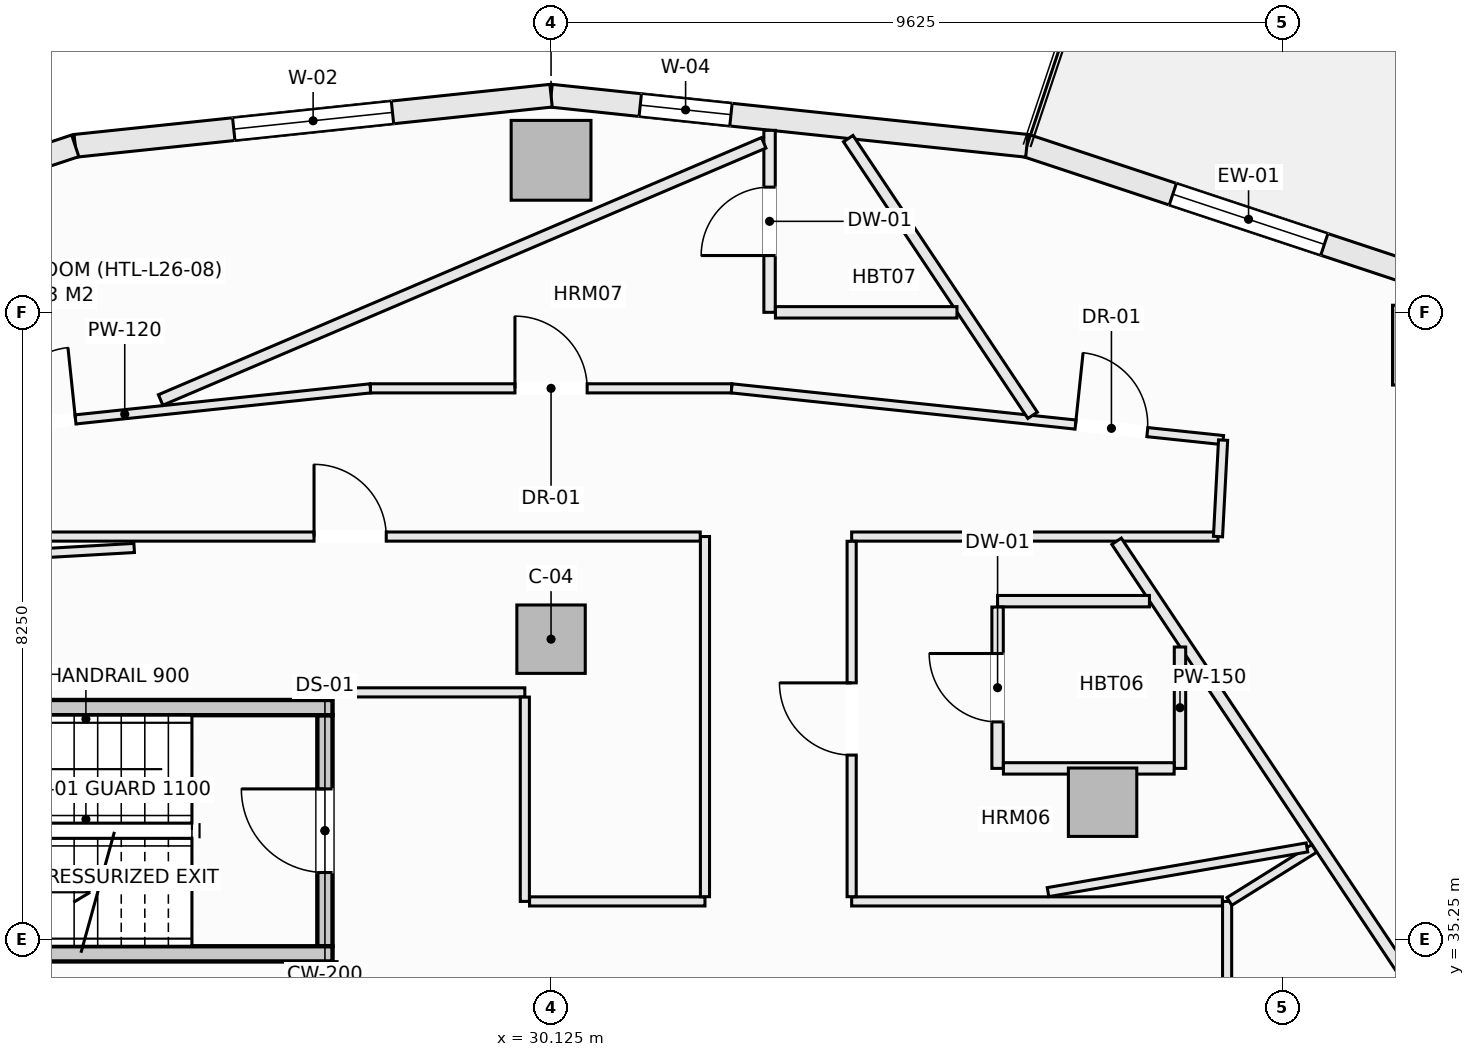
"""IFC4 building model, lengths in metres.
Left out: names, types, materials, properties, quantities, classifications, styles, units other than length and angle.
Written with IfcOpenShell. Run it as: python <this file> out.ifc"""

import sys

from ifc_helpers import new_model, si_unit, direction, frame, frame_2d, origin, origin_2d, place, context, subcontext, project, spatial, rectangle, extrude, element, fill, save


model = new_model("IFC4")
c1 = context("Model", 3, precision=1e-05, world=origin(), true_north=direction((0.0, 1.0)))
c2 = subcontext(c1, "Body", "Model", "MODEL_VIEW")
j1 = project(units=[si_unit("LENGTHUNIT", "METRE"), si_unit("PLANEANGLEUNIT", "RADIAN")], contexts=[c1])
p1 = place(None, origin())
s1 = spatial("IfcSite", under=j1, at=p1, CompositionType="ELEMENT")
p2 = place(p1, origin())
s2 = spatial("IfcBuilding", under=s1, at=p2, CompositionType="ELEMENT")
p3 = place(p2, frame((0.0, 0.0, 108.7)))
s3 = spatial("IfcBuildingStorey", under=s2, at=p3, CompositionType="ELEMENT", Elevation=108.7)
for number, where, z_axis, x_axis in (
    (1, (41.721, 43.068, -0.27), (0.0, 0.0, 1.0), (1.0, 0.0, 0.0)),
    (2, (30.125, 45.5, -0.27), (0.0, 0.0, 1.0), (1.0, 0.0, 0.0)),
):
    element("IfcColumn", number, at=place(p3, frame(where, z_axis=z_axis, x_axis=x_axis)), inside=s3, PredefinedType="COLUMN", context=c2, shape_type="SweptSolid", body=[
        extrude(rectangle(XDim=1.05, YDim=1.05, at=origin_2d()), origin(), (0.0, 0.0, 1.0), 3.4),
    ])
for number, where, z_axis, x_axis in (
    (3, (37.382, 37.055, -0.27), (0.0, 0.0, 1.0), (1.0, 0.0, 0.0)),
    (4, (30.125, 39.2, -0.27), (0.0, 0.0, 1.0), (1.0, 0.0, 0.0)),
):
    element("IfcColumn", number, at=place(p3, frame(where, z_axis=z_axis, x_axis=x_axis)), inside=s3, PredefinedType="COLUMN", context=c2, shape_type="SweptSolid", body=[
        extrude(rectangle(XDim=0.9, YDim=0.9, at=origin_2d()), origin(), (0.0, 0.0, 1.0), 3.4),
    ])
p4 = place(p3, frame((36.385, 45.691, 0.0), z_axis=(0.0, 0.0, 1.0), x_axis=(0.949238009374, -0.314558741032, 0.0)))
e5 = element("IfcWall", 5, at=p4, inside=s3, PredefinedType="SOLIDWALL", context=c2, shape_type="SweptSolid", body=[
    extrude(rectangle(XDim=6.146, YDim=0.3, at=frame_2d((3.073, 0.0))), origin(), (0.0, 0.0, 1.0), 2.653),
])
p5 = place(p4, frame((2.023, 0.0, 0.74)))
e6 = element("IfcOpeningElement", 6, at=p5, cuts=e5, PredefinedType="OPENING", context=c2, shape_type="SweptSolid", body=[
    extrude(rectangle(XDim=2.1, YDim=1.7, at=frame_2d((1.05, 0.85))), frame((0.0, 0.16, 0.0), z_axis=(0.0, -1.0, 0.0), x_axis=(1.0, 0.0, 0.0)), (0.0, 0.0, 1.0), 0.32),
])
p6 = place(p3, frame((30.125, 46.35, 0.0), z_axis=(0.0, 0.0, 1.0), x_axis=(0.994498012394, -0.104755445421, 0.0)))
e7 = element("IfcWall", 7, at=p6, inside=s3, PredefinedType="SOLIDWALL", context=c2, shape_type="SweptSolid", body=[
    extrude(rectangle(XDim=6.295, YDim=0.3, at=frame_2d((3.147, 0.0))), origin(), (0.0, 0.0, 1.0), 2.653),
])
p7 = place(p6, frame((1.18, 0.0, 0.72)))
e8 = element("IfcOpeningElement", 8, at=p7, cuts=e7, PredefinedType="OPENING", context=c2, shape_type="SweptSolid", body=[
    extrude(rectangle(XDim=1.2, YDim=1.65, at=frame_2d((0.6, 0.825))), frame((0.0, 0.16, 0.0), z_axis=(0.0, -1.0, 0.0), x_axis=(1.0, 0.0, 0.0)), (0.0, 0.0, 1.0), 0.32),
])
p8 = place(p3, frame((23.865, 45.691, 0.0), z_axis=(0.0, 0.0, 1.0), x_axis=(0.994498012394, 0.104755445421, 0.0)))
e9 = element("IfcWall", 9, at=p8, inside=s3, PredefinedType="SOLIDWALL", context=c2, shape_type="SweptSolid", body=[
    extrude(rectangle(XDim=6.295, YDim=0.3, at=frame_2d((3.147, 0.0))), origin(), (0.0, 0.0, 1.0), 2.653),
])
p9 = place(p8, frame((2.097, 0.0, 0.74)))
e10 = element("IfcOpeningElement", 10, at=p9, cuts=e9, PredefinedType="OPENING", context=c2, shape_type="SweptSolid", body=[
    extrude(rectangle(XDim=2.1, YDim=1.7, at=frame_2d((1.05, 0.85))), frame((0.0, 0.16, 0.0), z_axis=(0.0, -1.0, 0.0), x_axis=(1.0, 0.0, 0.0)), (0.0, 0.0, 1.0), 0.32),
])
p10 = place(p3, frame((18.031, 43.758, 0.0), z_axis=(0.0, 0.0, 1.0), x_axis=(0.949238009374, 0.314558741032, 0.0)))
e11 = element("IfcWall", 11, at=p10, inside=s3, PredefinedType="SOLIDWALL", context=c2, shape_type="SweptSolid", body=[
    extrude(rectangle(XDim=6.146, YDim=0.3, at=frame_2d((3.073, 0.0))), origin(), (0.0, 0.0, 1.0), 2.653),
])
p11 = place(p10, frame((2.023, 0.0, 0.74)))
e12 = element("IfcOpeningElement", 12, at=p11, cuts=e11, PredefinedType="OPENING", context=c2, shape_type="SweptSolid", body=[
    extrude(rectangle(XDim=2.1, YDim=1.7, at=frame_2d((1.05, 0.85))), frame((0.0, 0.16, 0.0), z_axis=(0.0, -1.0, 0.0), x_axis=(1.0, 0.0, 0.0)), (0.0, 0.0, 1.0), 0.32),
])
p12 = place(p3, frame((37.419, 48.913, 0.0), z_axis=(0.0, 0.0, 1.0), x_axis=(0.941632697311, -0.336642040387, 0.0)))
e13 = element("IfcWall", 13, at=p12, inside=s3, PredefinedType="PARAPET", context=c2, shape_type="SweptSolid", body=[
    extrude(rectangle(XDim=7.236, YDim=0.22, at=frame_2d((3.618, 0.0))), origin(), (0.0, 0.0, 1.0), 0.52),
])
p13 = place(p3, frame((27.15, 35.16, -0.27), z_axis=(0.0, 0.0, 1.0), x_axis=(0.0, 1.0, 0.0)))
e14 = element("IfcWall", 14, at=p13, inside=s3, PredefinedType="SHEAR", context=c2, shape_type="SweptSolid", body=[
    extrude(rectangle(XDim=3.04, YDim=0.2, at=frame_2d((1.52, 0.0))), origin(), (0.0, 0.0, 1.0), 3.4),
])
p14 = place(p13, frame((0.97, 0.0, 0.27)))
e15 = element("IfcOpeningElement", 15, at=p14, cuts=e14, PredefinedType="OPENING", context=c2, shape_type="SweptSolid", body=[
    extrude(rectangle(XDim=1.1, YDim=2.15, at=frame_2d((0.55, 1.075))), frame((0.0, 0.11, 0.0), z_axis=(0.0, -1.0, 0.0), x_axis=(1.0, 0.0, 0.0)), (0.0, 0.0, 1.0), 0.22),
])
for number, where, z_axis, x_axis in (
    (16, (18.3, 38.3, -0.27), (0.0, 0.0, 1.0), (1.0, 0.0, 0.0)),
    (17, (18.3, 35.06, -0.27), (0.0, 0.0, 1.0), (1.0, 0.0, 0.0)),
):
    element("IfcWall", number, at=place(p3, frame(where, z_axis=z_axis, x_axis=x_axis)), inside=s3, PredefinedType="SHEAR", context=c2, shape_type="SweptSolid", body=[
        extrude(rectangle(XDim=8.95, YDim=0.2, at=frame_2d((4.475, 0.0))), origin(), (0.0, 0.0, 1.0), 3.4),
    ])
p15 = place(p3, frame((39.02, 33.75, 0.0), z_axis=(0.0, 0.0, 1.0), x_axis=(0.0, 1.0, 0.0)))
e18 = element("IfcWall", 18, at=p15, inside=s3, PredefinedType="PARTITIONING", context=c2, shape_type="SweptSolid", body=[
    extrude(rectangle(XDim=2.0, YDim=0.12, at=frame_2d((1.0, 0.0))), origin(), (0.0, 0.0, 1.0), 3.13),
])
p16 = place(p3, frame((27.25, 34.152, 0.0), z_axis=(0.0, 0.0, 1.0), x_axis=(0.0, 1.0, 0.0)))
e19 = element("IfcWall", 19, at=p16, inside=s3, PredefinedType="PARTITIONING", context=c2, shape_type="SweptSolid", body=[
    extrude(rectangle(XDim=0.806, YDim=0.12, at=frame_2d((0.403, 0.0))), origin(), (0.0, 0.0, 1.0), 3.13),
])
p17 = place(p3, frame((27.25, 38.5, 0.0), z_axis=(0.0, 0.0, 1.0), x_axis=(1.0, 0.0, 0.0)))
e20 = element("IfcWall", 20, at=p17, inside=s3, PredefinedType="PARTITIONING", context=c2, shape_type="SweptSolid", body=[
    extrude(rectangle(XDim=2.53, YDim=0.12, at=frame_2d((1.265, 0.0))), origin(), (0.0, 0.0, 1.0), 3.13),
])
p18 = place(p3, frame((29.78, 35.75, 0.0), z_axis=(0.0, 0.0, 1.0), x_axis=(0.0, 1.0, 0.0)))
e21 = element("IfcWall", 21, at=p18, inside=s3, PredefinedType="PARTITIONING", context=c2, shape_type="SweptSolid", body=[
    extrude(rectangle(XDim=2.688, YDim=0.12, at=frame_2d((1.344, 0.0))), origin(), (0.0, 0.0, 1.0), 3.13),
])
p19 = place(p3, frame((29.842, 35.75, 0.0), z_axis=(0.0, 0.0, 1.0), x_axis=(1.0, 0.0, 0.0)))
e22 = element("IfcWall", 22, at=p19, inside=s3, PredefinedType="PARTITIONING", context=c2, shape_type="SweptSolid", body=[
    extrude(rectangle(XDim=2.308, YDim=0.12, at=frame_2d((1.154, 0.0))), origin(), (0.0, 0.0, 1.0), 3.13),
])
p20 = place(p3, frame((34.08, 35.75, 0.0), z_axis=(0.0, 0.0, 1.0), x_axis=(1.0, 0.0, 0.0)))
e23 = element("IfcWall", 23, at=p20, inside=s3, PredefinedType="PARTITIONING", context=c2, shape_type="SweptSolid", body=[
    extrude(rectangle(XDim=4.878, YDim=0.12, at=frame_2d((2.439, 0.0))), origin(), (0.0, 0.0, 1.0), 2.505),
])
p21 = place(p3, frame((32.15, 35.812, 0.0), z_axis=(0.0, 0.0, 1.0), x_axis=(0.0, 1.0, 0.0)))
e24 = element("IfcWall", 24, at=p21, inside=s3, PredefinedType="PARTITIONING", context=c2, shape_type="SweptSolid", body=[
    extrude(rectangle(XDim=4.738, YDim=0.12, at=frame_2d((2.369, 0.0))), origin(), (0.0, 0.0, 1.0), 3.13),
])
p22 = place(p3, frame((21.351, 40.55, 0.0), z_axis=(0.0, 0.0, 1.0), x_axis=(1.0, 0.0, 0.0)))
e25 = element("IfcWall", 25, at=p22, inside=s3, PredefinedType="PARTITIONING", context=c2, shape_type="SweptSolid", body=[
    extrude(rectangle(XDim=10.737, YDim=0.12, at=frame_2d((5.369, 0.0))), origin(), (0.0, 0.0, 1.0), 3.13),
])
p23 = place(p22, frame((5.656, 0.0, 0.0)))
e26 = element("IfcOpeningElement", 26, at=p23, cuts=e25, PredefinedType="OPENING", context=c2, shape_type="SweptSolid", body=[
    extrude(rectangle(XDim=0.95, YDim=2.1, at=frame_2d((0.475, 1.05))), frame((0.0, 0.07, 0.0), z_axis=(0.0, -1.0, 0.0), x_axis=(1.0, 0.0, 0.0)), (0.0, 0.0, 1.0), 0.14),
])
p24 = place(p3, frame((34.08, 40.55, 0.0), z_axis=(0.0, 0.0, 1.0), x_axis=(1.0, 0.0, 0.0)))
e27 = element("IfcWall", 27, at=p24, inside=s3, PredefinedType="PARTITIONING", context=c2, shape_type="SweptSolid", body=[
    extrude(rectangle(XDim=4.82, YDim=0.12, at=frame_2d((2.41, 0.0))), origin(), (0.0, 0.0, 1.0), 3.13),
])
p25 = place(p3, frame((21.283, 41.819, 0.0), z_axis=(0.0, 0.0, 1.0), x_axis=(0.994501131299, 0.104725831799, 0.0)))
e28 = element("IfcWall", 28, at=p25, inside=s3, PredefinedType="PARTITIONING", context=c2, shape_type="SweptSolid", body=[
    extrude(rectangle(XDim=6.502, YDim=0.12, at=frame_2d((3.251, 0.0))), origin(), (0.0, 0.0, 1.0), 3.13),
])
p26 = place(p25, frame((1.649, 0.0, 0.0)))
e29 = element("IfcOpeningElement", 29, at=p26, cuts=e28, PredefinedType="OPENING", context=c2, shape_type="SweptSolid", body=[
    extrude(rectangle(XDim=0.95, YDim=2.1, at=frame_2d((0.475, 1.05))), frame((0.0, 0.07, 0.0), z_axis=(0.0, -1.0, 0.0), x_axis=(1.0, 0.0, 0.0)), (0.0, 0.0, 1.0), 0.14),
])
p27 = place(p3, frame((27.749, 42.5, 0.0), z_axis=(0.0, 0.0, 1.0), x_axis=(1.0, 0.0, 0.0)))
e30 = element("IfcWall", 30, at=p27, inside=s3, PredefinedType="PARTITIONING", context=c2, shape_type="SweptSolid", body=[
    extrude(rectangle(XDim=4.752, YDim=0.12, at=frame_2d((2.376, 0.0))), origin(), (0.0, 0.0, 1.0), 3.13),
])
p28 = place(p27, frame((1.901, 0.0, 0.0)))
e31 = element("IfcOpeningElement", 31, at=p28, cuts=e30, PredefinedType="OPENING", context=c2, shape_type="SweptSolid", body=[
    extrude(rectangle(XDim=0.95, YDim=2.1, at=frame_2d((0.475, 1.05))), frame((0.0, 0.07, 0.0), z_axis=(0.0, -1.0, 0.0), x_axis=(1.0, 0.0, 0.0)), (0.0, 0.0, 1.0), 0.14),
])
p29 = place(p3, frame((32.501, 42.5, 0.0), z_axis=(0.0, 0.0, 1.0), x_axis=(0.994501131299, -0.104725831799, 0.0)))
e32 = element("IfcWall", 32, at=p29, inside=s3, PredefinedType="PARTITIONING", context=c2, shape_type="SweptSolid", body=[
    extrude(rectangle(XDim=6.502, YDim=0.12, at=frame_2d((3.251, 0.0))), origin(), (0.0, 0.0, 1.0), 3.13),
])
p30 = place(p29, frame((4.55, 0.0, 0.0)))
e33 = element("IfcOpeningElement", 33, at=p30, cuts=e32, PredefinedType="OPENING", context=c2, shape_type="SweptSolid", body=[
    extrude(rectangle(XDim=0.95, YDim=2.1, at=frame_2d((0.475, 1.05))), frame((0.0, 0.07, 0.0), z_axis=(0.0, -1.0, 0.0), x_axis=(1.0, 0.0, 0.0)), (0.0, 0.0, 1.0), 0.14),
])
p31 = place(p3, frame((38.9, 40.55, 0.0), z_axis=(0.0, 0.0, 1.0), x_axis=(0.052831079727, 0.99860346335, 0.0)))
e34 = element("IfcWall", 34, at=p31, inside=s3, PredefinedType="PARTITIONING", context=c2, shape_type="SweptSolid", body=[
    extrude(rectangle(XDim=1.271, YDim=0.12, at=frame_2d((0.635, 0.0))), origin(), (0.0, 0.0, 1.0), 3.13),
])
p32 = place(p3, frame((34.08, 35.812, 0.0), z_axis=(0.0, 0.0, 1.0), x_axis=(0.0, 1.0, 0.0)))
e35 = element("IfcWall", 35, at=p32, inside=s3, PredefinedType="PARTITIONING", context=c2, shape_type="SweptSolid", body=[
    extrude(rectangle(XDim=4.676, YDim=0.12, at=frame_2d((2.338, 0.0))), origin(), (0.0, 0.0, 1.0), 2.812),
])
p33 = place(p32, frame((1.863, 0.0, 0.0)))
e36 = element("IfcOpeningElement", 36, at=p33, cuts=e35, PredefinedType="OPENING", context=c2, shape_type="SweptSolid", body=[
    extrude(rectangle(XDim=0.95, YDim=2.1, at=frame_2d((0.475, 1.05))), frame((0.0, 0.07, 0.0), z_axis=(0.0, -1.0, 0.0), x_axis=(1.0, 0.0, 0.0)), (0.0, 0.0, 1.0), 0.14),
])
p34 = place(p3, frame((34.035, 45.785, 0.0), z_axis=(0.0, 0.0, 1.0), x_axis=(0.554584277701, -0.832127561691, 0.0)))
e37 = element("IfcWall", 37, at=p34, inside=s3, PredefinedType="PARTITIONING", context=c2, shape_type="SweptSolid", body=[
    extrude(rectangle(XDim=4.375, YDim=0.15, at=frame_2d((2.187, 0.0))), origin(), (0.0, 0.0, 1.0), 3.13),
])
p35 = place(p3, frame((37.565, 40.488, 0.0), z_axis=(0.0, 0.0, 1.0), x_axis=(0.554585457046, -0.832126775698, 0.0)))
e38 = element("IfcWall", 38, at=p35, inside=s3, PredefinedType="PARTITIONING", context=c2, shape_type="SweptSolid", body=[
    extrude(rectangle(XDim=19.151, YDim=0.15, at=frame_2d((9.575, 0.0))), origin(), (0.0, 0.0, 1.0), 3.13),
])
p36 = place(p3, frame((38.4, 37.5, 0.0), z_axis=(0.0, 0.0, 1.0), x_axis=(0.0, 1.0, 0.0)))
e39 = element("IfcWall", 39, at=p36, inside=s3, PredefinedType="PARTITIONING", context=c2, shape_type="SweptSolid", body=[
    extrude(rectangle(XDim=1.597, YDim=0.15, at=frame_2d((0.798, 0.0))), origin(), (0.0, 0.0, 1.0), 2.505),
])
p37 = place(p3, frame((39.05, 35.75, 0.0), z_axis=(0.0, 0.0, 1.0), x_axis=(0.848206690128, 0.529665376272, 0.0)))
e40 = element("IfcWall", 40, at=p37, inside=s3, PredefinedType="PARTITIONING", context=c2, shape_type="SweptSolid", body=[
    extrude(rectangle(XDim=1.316, YDim=0.12, at=frame_2d((0.658, 0.0))), origin(), (0.0, 0.0, 1.0), 3.13),
])
p38 = place(p3, frame((36.0, 39.7, 0.0), z_axis=(0.0, 0.0, 1.0), x_axis=(1.0, 0.0, 0.0)))
e41 = element("IfcWall", 41, at=p38, inside=s3, PredefinedType="PARTITIONING", context=c2, shape_type="SweptSolid", body=[
    extrude(rectangle(XDim=1.998, YDim=0.15, at=frame_2d((0.999, 0.0))), origin(), (0.0, 0.0, 1.0), 3.13),
])
p39 = place(p3, frame((36.0, 37.5, 0.0), z_axis=(0.0, 0.0, 1.0), x_axis=(0.0, 1.0, 0.0)))
e42 = element("IfcWall", 42, at=p39, inside=s3, PredefinedType="PARTITIONING", context=c2, shape_type="SweptSolid", body=[
    extrude(rectangle(XDim=2.123, YDim=0.15, at=frame_2d((1.062, 0.0))), origin(), (0.0, 0.0, 1.0), 3.13),
])
p40 = place(p39, frame((0.612, 0.0, 0.0)))
e43 = element("IfcOpeningElement", 43, at=p40, cuts=e42, PredefinedType="OPENING", context=c2, shape_type="SweptSolid", body=[
    extrude(rectangle(XDim=0.9, YDim=2.1, at=frame_2d((0.45, 1.05))), frame((0.0, 0.085, 0.0), z_axis=(0.0, -1.0, 0.0), x_axis=(1.0, 0.0, 0.0)), (0.0, 0.0, 1.0), 0.17),
])
p41 = place(p3, frame((36.077, 37.5, 0.0), z_axis=(0.0, 0.0, 1.0), x_axis=(1.0, 0.0, 0.0)))
e44 = element("IfcWall", 44, at=p41, inside=s3, PredefinedType="PARTITIONING", context=c2, shape_type="SweptSolid", body=[
    extrude(rectangle(XDim=2.246, YDim=0.15, at=frame_2d((1.123, 0.0))), origin(), (0.0, 0.0, 1.0), 2.505),
])
p42 = place(p3, frame((36.664, 35.872, 0.0), z_axis=(0.0, 0.0, 1.0), x_axis=(0.985420944478, 0.170133953648, 0.0)))
e45 = element("IfcWall", 45, at=p42, inside=s3, PredefinedType="PARTITIONING", context=c2, shape_type="SweptSolid", body=[
    extrude(rectangle(XDim=3.457, YDim=0.12, at=frame_2d((1.729, 0.0))), origin(), (0.0, 0.0, 1.0), 3.13),
])
p43 = place(p3, frame((33.0, 43.5, 0.0), z_axis=(0.0, 0.0, 1.0), x_axis=(0.0, 1.0, 0.0)))
e46 = element("IfcWall", 46, at=p43, inside=s3, PredefinedType="PARTITIONING", context=c2, shape_type="SweptSolid", body=[
    extrude(rectangle(XDim=2.394, YDim=0.15, at=frame_2d((1.197, 0.0))), origin(), (0.0, 0.0, 1.0), 3.13),
])
p44 = place(p43, frame((0.747, 0.0, 0.0)))
e47 = element("IfcOpeningElement", 47, at=p44, cuts=e46, PredefinedType="OPENING", context=c2, shape_type="SweptSolid", body=[
    extrude(rectangle(XDim=0.9, YDim=2.1, at=frame_2d((0.45, 1.05))), frame((0.0, 0.085, 0.0), z_axis=(0.0, -1.0, 0.0), x_axis=(1.0, 0.0, 0.0)), (0.0, 0.0, 1.0), 0.17),
])
p45 = place(p3, frame((33.077, 43.5, 0.0), z_axis=(0.0, 0.0, 1.0), x_axis=(1.0, 0.0, 0.0)))
e48 = element("IfcWall", 48, at=p45, inside=s3, PredefinedType="PARTITIONING", context=c2, shape_type="SweptSolid", body=[
    extrude(rectangle(XDim=2.389, YDim=0.15, at=frame_2d((1.194, 0.0))), origin(), (0.0, 0.0, 1.0), 3.13),
])
p46 = place(p3, frame((24.988, 42.347, 0.0), z_axis=(0.0, 0.0, 1.0), x_axis=(0.919871040712, 0.392220943423, 0.0)))
e49 = element("IfcWall", 49, at=p46, inside=s3, PredefinedType="PARTITIONING", context=c2, shape_type="SweptSolid", body=[
    extrude(rectangle(XDim=8.626, YDim=0.15, at=frame_2d((4.313, 0.0))), origin(), (0.0, 0.0, 1.0), 2.653),
])
p47 = place(p3, frame((19.95, 40.131, 0.0), z_axis=(0.0, 0.0, 1.0), x_axis=(0.998364901087, 0.057162262711, 0.0)))
e50 = element("IfcWall", 50, at=p47, inside=s3, PredefinedType="PARTITIONING", context=c2, shape_type="SweptSolid", body=[
    extrude(rectangle(XDim=4.698, YDim=0.12, at=frame_2d((2.349, 0.0))), origin(), (0.0, 0.0, 1.0), 3.13),
])
p48 = place(p5, origin())
e51 = element("IfcWindow", 51, at=p48, inside=s3, PartitioningType="SINGLE_PANEL", PredefinedType="WINDOW", context=c2, shape_type="SweptSolid", body=[
    extrude(rectangle(XDim=2.1, YDim=1.7, at=frame_2d((1.05, 0.85))), frame((0.0, 0.03, 0.0), z_axis=(0.0, -1.0, 0.0), x_axis=(1.0, 0.0, 0.0)), (0.0, 0.0, 1.0), 0.06),
])
fill(e6, e51)
p49 = place(p7, origin())
e52 = element("IfcWindow", 52, at=p49, inside=s3, PartitioningType="SINGLE_PANEL", PredefinedType="WINDOW", context=c2, shape_type="SweptSolid", body=[
    extrude(rectangle(XDim=1.2, YDim=1.65, at=frame_2d((0.6, 0.825))), frame((0.0, 0.03, 0.0), z_axis=(0.0, -1.0, 0.0), x_axis=(1.0, 0.0, 0.0)), (0.0, 0.0, 1.0), 0.06),
])
fill(e8, e52)
p50 = place(p9, origin())
e53 = element("IfcWindow", 53, at=p50, inside=s3, PartitioningType="SINGLE_PANEL", PredefinedType="WINDOW", context=c2, shape_type="SweptSolid", body=[
    extrude(rectangle(XDim=2.1, YDim=1.7, at=frame_2d((1.05, 0.85))), frame((0.0, 0.03, 0.0), z_axis=(0.0, -1.0, 0.0), x_axis=(1.0, 0.0, 0.0)), (0.0, 0.0, 1.0), 0.06),
])
fill(e10, e53)
p51 = place(p14, origin())
e54 = element("IfcDoor", 54, at=p51, inside=s3, OperationType="SINGLE_SWING_RIGHT", PredefinedType="DOOR", context=c2, shape_type="SweptSolid", body=[
    extrude(rectangle(XDim=1.1, YDim=2.15, at=frame_2d((0.55, 1.075))), frame((0.0, 0.025, 0.0), z_axis=(0.0, -1.0, 0.0), x_axis=(1.0, 0.0, 0.0)), (0.0, 0.0, 1.0), 0.05),
])
fill(e15, e54)
p52 = place(p30, origin())
e55 = element("IfcDoor", 55, at=p52, inside=s3, OperationType="SINGLE_SWING_LEFT", PredefinedType="DOOR", context=c2, shape_type="SweptSolid", body=[
    extrude(rectangle(XDim=0.95, YDim=2.1, at=frame_2d((0.475, 1.05))), frame((0.0, 0.025, 0.0), z_axis=(0.0, -1.0, 0.0), x_axis=(1.0, 0.0, 0.0)), (0.0, 0.0, 1.0), 0.05),
])
fill(e33, e55)
p53 = place(p33, origin())
e56 = element("IfcDoor", 56, at=p53, inside=s3, OperationType="SINGLE_SWING_RIGHT", PredefinedType="DOOR", context=c2, shape_type="SweptSolid", body=[
    extrude(rectangle(XDim=0.95, YDim=2.1, at=frame_2d((0.475, 1.05))), frame((0.0, 0.025, 0.0), z_axis=(0.0, -1.0, 0.0), x_axis=(1.0, 0.0, 0.0)), (0.0, 0.0, 1.0), 0.05),
])
fill(e36, e56)
p54 = place(p28, origin())
e57 = element("IfcDoor", 57, at=p54, inside=s3, OperationType="SINGLE_SWING_LEFT", PredefinedType="DOOR", context=c2, shape_type="SweptSolid", body=[
    extrude(rectangle(XDim=0.95, YDim=2.1, at=frame_2d((0.475, 1.05))), frame((0.0, 0.025, 0.0), z_axis=(0.0, -1.0, 0.0), x_axis=(1.0, 0.0, 0.0)), (0.0, 0.0, 1.0), 0.05),
])
fill(e31, e57)
p55 = place(p26, origin())
e58 = element("IfcDoor", 58, at=p55, inside=s3, OperationType="SINGLE_SWING_RIGHT", PredefinedType="DOOR", context=c2, shape_type="SweptSolid", body=[
    extrude(rectangle(XDim=0.95, YDim=2.1, at=frame_2d((0.475, 1.05))), frame((0.0, 0.025, 0.0), z_axis=(0.0, -1.0, 0.0), x_axis=(1.0, 0.0, 0.0)), (0.0, 0.0, 1.0), 0.05),
])
fill(e29, e58)
p56 = place(p23, origin())
e59 = element("IfcDoor", 59, at=p56, inside=s3, OperationType="SINGLE_SWING_LEFT", PredefinedType="DOOR", context=c2, shape_type="SweptSolid", body=[
    extrude(rectangle(XDim=0.95, YDim=2.1, at=frame_2d((0.475, 1.05))), frame((0.0, 0.025, 0.0), z_axis=(0.0, -1.0, 0.0), x_axis=(1.0, 0.0, 0.0)), (0.0, 0.0, 1.0), 0.05),
])
fill(e26, e59)
p57 = place(p40, origin())
e60 = element("IfcDoor", 60, at=p57, inside=s3, OperationType="SINGLE_SWING_RIGHT", PredefinedType="DOOR", context=c2, shape_type="SweptSolid", body=[
    extrude(rectangle(XDim=0.9, YDim=2.1, at=frame_2d((0.45, 1.05))), frame((0.0, 0.025, 0.0), z_axis=(0.0, -1.0, 0.0), x_axis=(1.0, 0.0, 0.0)), (0.0, 0.0, 1.0), 0.05),
])
fill(e43, e60)
p58 = place(p44, origin())
e61 = element("IfcDoor", 61, at=p58, inside=s3, OperationType="SINGLE_SWING_LEFT", PredefinedType="DOOR", context=c2, shape_type="SweptSolid", body=[
    extrude(rectangle(XDim=0.9, YDim=2.1, at=frame_2d((0.45, 1.05))), frame((0.0, 0.025, 0.0), z_axis=(0.0, -1.0, 0.0), x_axis=(1.0, 0.0, 0.0)), (0.0, 0.0, 1.0), 0.05),
])
fill(e47, e61)
save(model, sys.argv[1])
